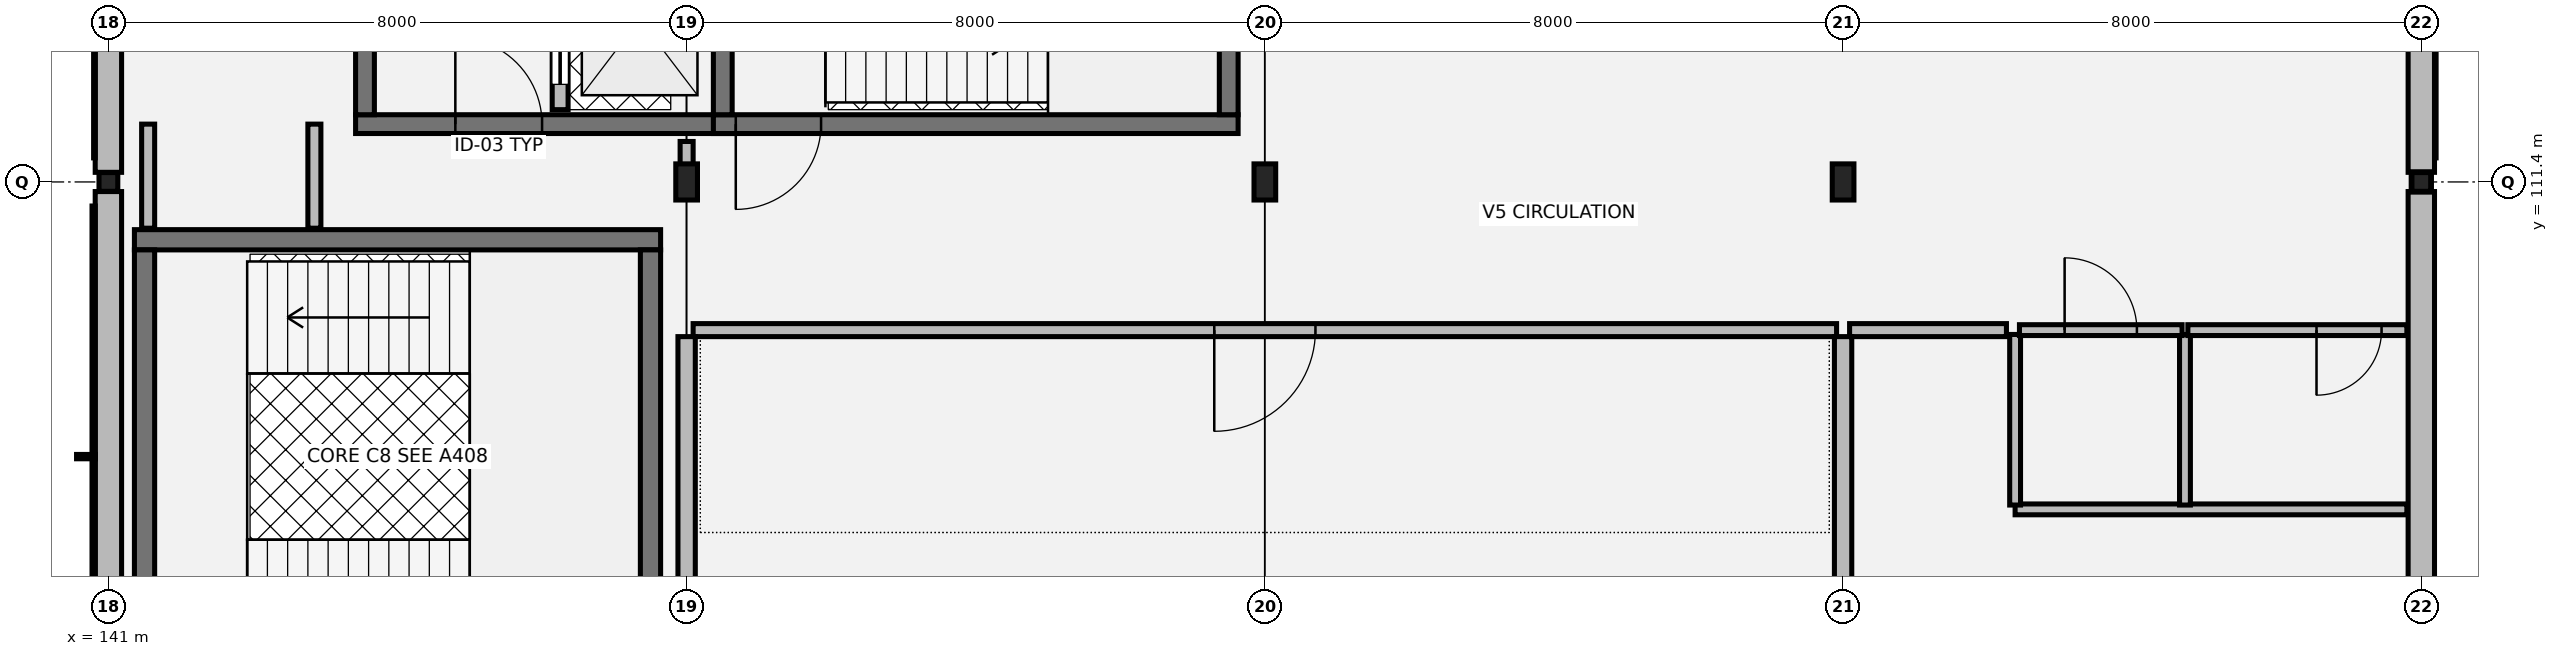
"""IFC4 building model, lengths in metres.
Left out: names, types, materials, properties, quantities, classifications, styles, units other than length and angle.
Written with IfcOpenShell. Run it as: python <this file> out.ifc"""

import sys

from ifc_helpers import new_model, si_unit, direction, frame, frame_2d, origin, origin_2d, place, context, subcontext, project, spatial, rectangle, hollow_rectangle, i_section, extrude, element, fill, save


model = new_model("IFC4")
c1 = context("Model", 3, precision=1e-05, world=origin(), true_north=direction((0.0, 1.0)))
c2 = subcontext(c1, "Body", "Model", "MODEL_VIEW")
j1 = project(units=[si_unit("LENGTHUNIT", "METRE"), si_unit("PLANEANGLEUNIT", "RADIAN")], contexts=[c1])
p1 = place(None, origin())
s1 = spatial("IfcSite", under=j1, at=p1, CompositionType="ELEMENT")
p2 = place(p1, origin())
s2 = spatial("IfcBuilding", under=s1, at=p2, CompositionType="ELEMENT")
p3 = place(p2, frame((0.0, 0.0, 9.18)))
s3 = spatial("IfcBuildingStorey", under=s2, at=p3, CompositionType="ELEMENT", Elevation=9.18)
p4 = place(p3, frame((141.0, 111.4, 0.0), z_axis=(0.0, 0.0, 1.0), x_axis=(1.0, 0.0, 0.0)))
e1 = element("IfcColumn", 1, at=p4, inside=s3, PredefinedType="COLUMN", context=c2, shape_type="SweptSolid", body=[
    extrude(hollow_rectangle(XDim=0.26, YDim=0.26, WallThickness=0.012, at=origin_2d()), origin(), (0.0, 0.0, 1.0), 4.055),
])
for number, where, z_axis, x_axis in (
    (2, (149.0, 111.4, 0.0), (0.0, 0.0, 1.0), (1.0, 0.0, 0.0)),
    (3, (157.0, 111.4, 0.0), (0.0, 0.0, 1.0), (1.0, 0.0, 0.0)),
    (4, (165.0, 111.4, 0.0), (0.0, 0.0, 1.0), (1.0, 0.0, 0.0)),
):
    element("IfcColumn", number, at=place(p3, frame(where, z_axis=z_axis, x_axis=x_axis)), inside=s3, PredefinedType="COLUMN", context=c2, shape_type="SweptSolid", body=[
        extrude(i_section(OverallWidth=0.3, OverallDepth=0.5, WebThickness=0.014, FlangeThickness=0.028, at=origin_2d()), origin(), (0.0, 0.0, 1.0), 4.055),
    ])
p5 = place(p3, frame((173.0, 111.4, 0.0), z_axis=(0.0, 0.0, 1.0), x_axis=(1.0, 0.0, 0.0)))
e5 = element("IfcColumn", 5, at=p5, inside=s3, PredefinedType="COLUMN", context=c2, shape_type="SweptSolid", body=[
    extrude(hollow_rectangle(XDim=0.26, YDim=0.26, WallThickness=0.012, at=origin_2d()), origin(), (0.0, 0.0, 1.0), 3.85),
])
p6 = place(p3, frame((173.0, 103.933, 0.0), z_axis=(0.0, 0.0, 1.0), x_axis=(0.0, 1.0, 0.0)))
e6 = element("IfcWall", 6, at=p6, inside=s3, PredefinedType="SOLIDWALL", context=c2, shape_type="SweptSolid", body=[
    extrude(rectangle(XDim=7.334, YDim=0.365, at=frame_2d((3.667, 0.0))), origin(), (0.0, 0.0, 1.0), 3.48),
])
p7 = place(p3, frame((173.0, 111.533, 0.0), z_axis=(0.0, 0.0, 1.0), x_axis=(0.0, 1.0, 0.0)))
e7 = element("IfcWall", 7, at=p7, inside=s3, PredefinedType="SOLIDWALL", context=c2, shape_type="SweptSolid", body=[
    extrude(rectangle(XDim=7.334, YDim=0.365, at=frame_2d((3.667, 0.0))), origin(), (0.0, 0.0, 1.0), 3.48),
])
p8 = place(p7, frame((2.192, 0.0, 0.8)))
e8 = element("IfcOpeningElement", 8, at=p8, cuts=e7, PredefinedType="OPENING", context=c2, shape_type="SweptSolid", body=[
    extrude(rectangle(XDim=1.15, YDim=2.1, at=frame_2d((0.575, 1.05))), frame((0.0, 0.192, 0.0), z_axis=(0.0, -1.0, 0.0), x_axis=(1.0, 0.0, 0.0)), (0.0, 0.0, 1.0), 0.385),
])
p9 = place(p7, frame((3.992, 0.0, 0.8)))
e9 = element("IfcOpeningElement", 9, at=p9, cuts=e7, PredefinedType="OPENING", context=c2, shape_type="SweptSolid", body=[
    extrude(rectangle(XDim=1.15, YDim=2.1, at=frame_2d((0.575, 1.05))), frame((0.0, 0.192, 0.0), z_axis=(0.0, -1.0, 0.0), x_axis=(1.0, 0.0, 0.0)), (0.0, 0.0, 1.0), 0.385),
])
p10 = place(p3, frame((141.0, 118.867, 0.0), z_axis=(0.0, 0.0, 1.0), x_axis=(0.0, -1.0, 0.0)))
e10 = element("IfcWall", 10, at=p10, inside=s3, PredefinedType="SOLIDWALL", context=c2, shape_type="SweptSolid", body=[
    extrude(rectangle(XDim=7.334, YDim=0.365, at=frame_2d((3.667, 0.0))), origin(), (0.0, 0.0, 1.0), 3.48),
])
p11 = place(p10, frame((2.192, 0.0, 0.8)))
e11 = element("IfcOpeningElement", 11, at=p11, cuts=e10, PredefinedType="OPENING", context=c2, shape_type="SweptSolid", body=[
    extrude(rectangle(XDim=1.15, YDim=2.1, at=frame_2d((0.575, 1.05))), frame((0.0, 0.192, 0.0), z_axis=(0.0, -1.0, 0.0), x_axis=(1.0, 0.0, 0.0)), (0.0, 0.0, 1.0), 0.385),
])
p12 = place(p10, frame((3.992, 0.0, 0.8)))
e12 = element("IfcOpeningElement", 12, at=p12, cuts=e10, PredefinedType="OPENING", context=c2, shape_type="SweptSolid", body=[
    extrude(rectangle(XDim=1.15, YDim=2.1, at=frame_2d((0.575, 1.05))), frame((0.0, 0.192, 0.0), z_axis=(0.0, -1.0, 0.0), x_axis=(1.0, 0.0, 0.0)), (0.0, 0.0, 1.0), 0.385),
])
p13 = place(p3, frame((141.0, 111.267, 0.0), z_axis=(0.0, 0.0, 1.0), x_axis=(0.0, -1.0, 0.0)))
e13 = element("IfcWall", 13, at=p13, inside=s3, PredefinedType="SOLIDWALL", context=c2, shape_type="SweptSolid", body=[
    extrude(rectangle(XDim=7.334, YDim=0.365, at=frame_2d((3.667, 0.0))), origin(), (0.0, 0.0, 1.0), 3.48),
])
p14 = place(p3, frame((144.42, 112.2, 0.0), z_axis=(0.0, 0.0, 1.0), x_axis=(1.0, 0.0, 0.0)))
e14 = element("IfcWall", 14, at=p14, inside=s3, PredefinedType="SHEAR", context=c2, shape_type="SweptSolid", body=[
    extrude(rectangle(XDim=5.21, YDim=0.26, at=frame_2d((2.605, 0.0))), origin(), (0.0, 0.0, 1.0), 3.845),
])
p15 = place(p14, frame((1.38, 0.0, 0.0)))
e15 = element("IfcOpeningElement", 15, at=p15, cuts=e14, PredefinedType="OPENING", context=c2, shape_type="SweptSolid", body=[
    extrude(rectangle(XDim=1.2, YDim=2.16, at=frame_2d((0.6, 1.08))), frame((0.0, 0.14, 0.0), z_axis=(0.0, -1.0, 0.0), x_axis=(1.0, 0.0, 0.0)), (0.0, 0.0, 1.0), 0.28),
])
p16 = place(p3, frame((144.55, 118.07, 0.0), z_axis=(0.0, 0.0, 1.0), x_axis=(0.0, -1.0, 0.0)))
e16 = element("IfcWall", 16, at=p16, inside=s3, PredefinedType="SHEAR", context=c2, shape_type="SweptSolid", body=[
    extrude(rectangle(XDim=5.74, YDim=0.26, at=frame_2d((2.87, 0.0))), origin(), (0.0, 0.0, 1.0), 3.845),
])
p17 = place(p3, frame((147.25, 112.4, 0.0), z_axis=(0.0, 0.0, 1.0), x_axis=(0.0, 1.0, 0.0)))
e17 = element("IfcWall", 17, at=p17, inside=s3, PredefinedType="SOLIDWALL", context=c2, shape_type="SweptSolid", body=[
    extrude(rectangle(XDim=5.6, YDim=0.22, at=frame_2d((2.8, 0.0))), origin(), (0.0, 0.0, 1.0), 3.845),
])
p18 = place(p17, frame((0.35, 0.0, 0.0)))
e18 = element("IfcOpeningElement", 18, at=p18, cuts=e17, PredefinedType="OPENING", context=c2, shape_type="SweptSolid", body=[
    extrude(rectangle(XDim=1.1, YDim=2.15, at=frame_2d((0.55, 1.075))), frame((0.0, 0.12, 0.0), z_axis=(0.0, -1.0, 0.0), x_axis=(1.0, 0.0, 0.0)), (0.0, 0.0, 1.0), 0.24),
])
p19 = place(p17, frame((2.4, 0.0, 0.0)))
e19 = element("IfcOpeningElement", 19, at=p19, cuts=e17, PredefinedType="OPENING", context=c2, shape_type="SweptSolid", body=[
    extrude(rectangle(XDim=1.3, YDim=2.18, at=frame_2d((0.65, 1.09))), frame((0.0, 0.12, 0.0), z_axis=(0.0, -1.0, 0.0), x_axis=(1.0, 0.0, 0.0)), (0.0, 0.0, 1.0), 0.24),
])
p20 = place(p3, frame((149.37, 112.2, 0.0), z_axis=(0.0, 0.0, 1.0), x_axis=(1.0, 0.0, 0.0)))
e20 = element("IfcWall", 20, at=p20, inside=s3, PredefinedType="SHEAR", context=c2, shape_type="SweptSolid", body=[
    extrude(rectangle(XDim=7.26, YDim=0.26, at=frame_2d((3.63, 0.0))), origin(), (0.0, 0.0, 1.0), 3.845),
])
p21 = place(p20, frame((0.31, 0.0, 0.0)))
e21 = element("IfcOpeningElement", 21, at=p21, cuts=e20, PredefinedType="OPENING", context=c2, shape_type="SweptSolid", body=[
    extrude(rectangle(XDim=1.18, YDim=2.18, at=frame_2d((0.59, 1.09))), frame((0.0, 0.14, 0.0), z_axis=(0.0, -1.0, 0.0), x_axis=(1.0, 0.0, 0.0)), (0.0, 0.0, 1.0), 0.28),
])
for number, where, z_axis, x_axis in (
    (22, (149.5, 112.33, 0.0), (0.0, 0.0, 1.0), (0.0, 1.0, 0.0)),
    (23, (156.5, 112.33, 0.0), (0.0, 0.0, 1.0), (0.0, 1.0, 0.0)),
):
    element("IfcWall", number, at=place(p3, frame(where, z_axis=z_axis, x_axis=x_axis)), inside=s3, PredefinedType="SHEAR", context=c2, shape_type="SweptSolid", body=[
        extrude(rectangle(XDim=5.74, YDim=0.26, at=frame_2d((2.87, 0.0))), origin(), (0.0, 0.0, 1.0), 3.845),
    ])
p22 = place(p3, frame((141.36, 110.6, 0.0), z_axis=(0.0, 0.0, 1.0), x_axis=(1.0, 0.0, 0.0)))
e24 = element("IfcWall", 24, at=p22, inside=s3, PredefinedType="SHEAR", context=c2, shape_type="SweptSolid", body=[
    extrude(rectangle(XDim=7.28, YDim=0.28, at=frame_2d((3.64, 0.0))), origin(), (0.0, 0.0, 1.0), 3.845),
])
for number, where, z_axis, x_axis in (
    (25, (141.5, 104.74, 0.0), (0.0, 0.0, 1.0), (0.0, 1.0, 0.0)),
    (26, (148.5, 104.74, 0.0), (0.0, 0.0, 1.0), (0.0, 1.0, 0.0)),
):
    element("IfcWall", number, at=place(p3, frame(where, z_axis=z_axis, x_axis=x_axis)), inside=s3, PredefinedType="SHEAR", context=c2, shape_type="SweptSolid", body=[
        extrude(rectangle(XDim=5.72, YDim=0.28, at=frame_2d((2.86, 0.0))), origin(), (0.0, 0.0, 1.0), 3.845),
    ])
p23 = place(p3, frame((167.38, 106.87, 0.0), z_axis=(0.0, 0.0, 1.0), x_axis=(1.0, 0.0, 0.0)))
e27 = element("IfcWall", 27, at=p23, inside=s3, PredefinedType="PARTITIONING", context=c2, shape_type="SweptSolid", body=[
    extrude(rectangle(XDim=5.42, YDim=0.15, at=frame_2d((2.71, 0.0))), origin(), (0.0, 0.0, 1.0), 3.18),
])
for number, where, z_axis, x_axis in (
    (28, (167.38, 106.93, 0.0), (0.0, 0.0, 1.0), (0.0, 1.0, 0.0)),
    (29, (169.73, 106.93, 0.0), (0.0, 0.0, 1.0), (0.0, 1.0, 0.0)),
):
    element("IfcWall", number, at=place(p3, frame(where, z_axis=z_axis, x_axis=x_axis)), inside=s3, PredefinedType="PARTITIONING", context=c2, shape_type="SweptSolid", body=[
        extrude(rectangle(XDim=2.36, YDim=0.15, at=frame_2d((1.18, 0.0))), origin(), (0.0, 0.0, 1.0), 3.18),
    ])
p24 = place(p3, frame((167.44, 109.35, 0.0), z_axis=(0.0, 0.0, 1.0), x_axis=(1.0, 0.0, 0.0)))
e30 = element("IfcWall", 30, at=p24, inside=s3, PredefinedType="PARTITIONING", context=c2, shape_type="SweptSolid", body=[
    extrude(rectangle(XDim=2.25, YDim=0.15, at=frame_2d((1.125, 0.0))), origin(), (0.0, 0.0, 1.0), 3.18),
])
p25 = place(p24, frame((0.625, 0.0, 0.0)))
e31 = element("IfcOpeningElement", 31, at=p25, cuts=e30, PredefinedType="OPENING", context=c2, shape_type="SweptSolid", body=[
    extrude(rectangle(XDim=1.0, YDim=2.15, at=frame_2d((0.5, 1.075))), frame((0.0, 0.085, 0.0), z_axis=(0.0, -1.0, 0.0), x_axis=(1.0, 0.0, 0.0)), (0.0, 0.0, 1.0), 0.17),
])
p26 = place(p3, frame((169.77, 109.35, 0.0), z_axis=(0.0, 0.0, 1.0), x_axis=(1.0, 0.0, 0.0)))
e32 = element("IfcWall", 32, at=p26, inside=s3, PredefinedType="PARTITIONING", context=c2, shape_type="SweptSolid", body=[
    extrude(rectangle(XDim=3.03, YDim=0.15, at=frame_2d((1.515, 0.0))), origin(), (0.0, 0.0, 1.0), 3.18),
])
p27 = place(p26, frame((1.78, 0.0, 0.0)))
e33 = element("IfcOpeningElement", 33, at=p27, cuts=e32, PredefinedType="OPENING", context=c2, shape_type="SweptSolid", body=[
    extrude(rectangle(XDim=0.9, YDim=2.15, at=frame_2d((0.45, 1.075))), frame((0.0, 0.085, 0.0), z_axis=(0.0, -1.0, 0.0), x_axis=(1.0, 0.0, 0.0)), (0.0, 0.0, 1.0), 0.17),
])
p28 = place(p3, frame((149.09, 109.35, 0.0), z_axis=(0.0, 0.0, 1.0), x_axis=(1.0, 0.0, 0.0)))
e34 = element("IfcWall", 34, at=p28, inside=s3, PredefinedType="PARTITIONING", context=c2, shape_type="SweptSolid", body=[
    extrude(rectangle(XDim=15.82, YDim=0.18, at=frame_2d((7.91, 0.0))), origin(), (0.0, 0.0, 1.0), 3.18),
])
p29 = place(p28, frame((7.21, 0.0, 0.0)))
e35 = element("IfcOpeningElement", 35, at=p29, cuts=e34, PredefinedType="OPENING", context=c2, shape_type="SweptSolid", body=[
    extrude(rectangle(XDim=1.4, YDim=2.22, at=frame_2d((0.7, 1.11))), frame((0.0, 0.1, 0.0), z_axis=(0.0, -1.0, 0.0), x_axis=(1.0, 0.0, 0.0)), (0.0, 0.0, 1.0), 0.2),
])
p30 = place(p3, frame((165.09, 109.35, 0.0), z_axis=(0.0, 0.0, 1.0), x_axis=(1.0, 0.0, 0.0)))
e36 = element("IfcWall", 36, at=p30, inside=s3, PredefinedType="PARTITIONING", context=c2, shape_type="SweptSolid", body=[
    extrude(rectangle(XDim=2.17, YDim=0.18, at=frame_2d((1.085, 0.0))), origin(), (0.0, 0.0, 1.0), 3.18),
])
p31 = place(p3, frame((149.0, 111.64, 0.0), z_axis=(0.0, 0.0, 1.0), x_axis=(0.0, 1.0, 0.0)))
e37 = element("IfcWall", 37, at=p31, inside=s3, PredefinedType="PARTITIONING", context=c2, shape_type="SweptSolid", body=[
    extrude(rectangle(XDim=0.32, YDim=0.18, at=frame_2d((0.16, 0.0))), origin(), (0.0, 0.0, 1.0), 3.18),
])
for number, where, z_axis, x_axis in (
    (38, (141.55, 110.76, 0.0), (0.0, 0.0, 1.0), (0.0, 1.0, 0.0)),
    (39, (143.85, 110.76, 0.0), (0.0, 0.0, 1.0), (0.0, 1.0, 0.0)),
):
    element("IfcWall", number, at=place(p3, frame(where, z_axis=z_axis, x_axis=x_axis)), inside=s3, PredefinedType="PARTITIONING", context=c2, shape_type="SweptSolid", body=[
        extrude(rectangle(XDim=1.44, YDim=0.18, at=frame_2d((0.72, 0.0))), origin(), (0.0, 0.0, 1.0), 3.18),
    ])
p32 = place(p3, frame((149.0, 73.72, 0.0), z_axis=(0.0, 0.0, 1.0), x_axis=(0.0, 1.0, 0.0)))
e40 = element("IfcWall", 40, at=p32, inside=s3, PredefinedType="SOLIDWALL", context=c2, shape_type="SweptSolid", body=[
    extrude(rectangle(XDim=35.54, YDim=0.24, at=frame_2d((17.77, 0.0))), origin(), (0.0, 0.0, 1.0), 3.18),
])
p33 = place(p32, frame((17.12, 0.0, 0.0)))
e41 = element("IfcOpeningElement", 41, at=p33, cuts=e40, PredefinedType="OPENING", context=c2, shape_type="SweptSolid", body=[
    extrude(rectangle(XDim=1.3, YDim=2.2, at=frame_2d((0.65, 1.1))), frame((0.0, 0.13, 0.0), z_axis=(0.0, -1.0, 0.0), x_axis=(1.0, 0.0, 0.0)), (0.0, 0.0, 1.0), 0.26),
])
p34 = place(p3, frame((165.0, 73.72, 0.0), z_axis=(0.0, 0.0, 1.0), x_axis=(0.0, 1.0, 0.0)))
e42 = element("IfcWall", 42, at=p34, inside=s3, PredefinedType="SOLIDWALL", context=c2, shape_type="SweptSolid", body=[
    extrude(rectangle(XDim=35.54, YDim=0.24, at=frame_2d((17.77, 0.0))), origin(), (0.0, 0.0, 1.0), 3.18),
])
p35 = place(p34, frame((17.12, 0.0, 0.0)))
e43 = element("IfcOpeningElement", 43, at=p35, cuts=e42, PredefinedType="OPENING", context=c2, shape_type="SweptSolid", body=[
    extrude(rectangle(XDim=1.3, YDim=2.2, at=frame_2d((0.65, 1.1))), frame((0.0, 0.13, 0.0), z_axis=(0.0, -1.0, 0.0), x_axis=(1.0, 0.0, 0.0)), (0.0, 0.0, 1.0), 0.26),
])
p36 = place(p15, origin())
e44 = element("IfcDoor", 44, at=p36, inside=s3, OperationType="SINGLE_SWING_LEFT", PredefinedType="DOOR", context=c2, shape_type="SweptSolid", body=[
    extrude(rectangle(XDim=1.2, YDim=2.16, at=frame_2d((0.6, 1.08))), frame((0.0, 0.025, 0.0), z_axis=(0.0, -1.0, 0.0), x_axis=(1.0, 0.0, 0.0)), (0.0, 0.0, 1.0), 0.05),
])
fill(e15, e44)
p37 = place(p18, origin())
e45 = element("IfcDoor", 45, at=p37, inside=s3, OperationType="SLIDING_TO_LEFT", PredefinedType="DOOR", context=c2, shape_type="SweptSolid", body=[
    extrude(rectangle(XDim=1.1, YDim=2.15, at=frame_2d((0.55, 1.075))), frame((0.0, 0.025, 0.0), z_axis=(0.0, -1.0, 0.0), x_axis=(1.0, 0.0, 0.0)), (0.0, 0.0, 1.0), 0.05),
])
fill(e18, e45)
p38 = place(p21, origin())
e46 = element("IfcDoor", 46, at=p38, inside=s3, OperationType="SINGLE_SWING_RIGHT", PredefinedType="DOOR", context=c2, shape_type="SweptSolid", body=[
    extrude(rectangle(XDim=1.18, YDim=2.18, at=frame_2d((0.59, 1.09))), frame((0.0, 0.025, 0.0), z_axis=(0.0, -1.0, 0.0), x_axis=(1.0, 0.0, 0.0)), (0.0, 0.0, 1.0), 0.05),
])
fill(e21, e46)
p39 = place(p25, origin())
e47 = element("IfcDoor", 47, at=p39, inside=s3, OperationType="SINGLE_SWING_LEFT", PredefinedType="DOOR", context=c2, shape_type="SweptSolid", body=[
    extrude(rectangle(XDim=1.0, YDim=2.15, at=frame_2d((0.5, 1.075))), frame((0.0, 0.025, 0.0), z_axis=(0.0, -1.0, 0.0), x_axis=(1.0, 0.0, 0.0)), (0.0, 0.0, 1.0), 0.05),
])
fill(e31, e47)
p40 = place(p27, origin())
e48 = element("IfcDoor", 48, at=p40, inside=s3, OperationType="SINGLE_SWING_RIGHT", PredefinedType="DOOR", context=c2, shape_type="SweptSolid", body=[
    extrude(rectangle(XDim=0.9, YDim=2.15, at=frame_2d((0.45, 1.075))), frame((0.0, 0.025, 0.0), z_axis=(0.0, -1.0, 0.0), x_axis=(1.0, 0.0, 0.0)), (0.0, 0.0, 1.0), 0.05),
])
fill(e33, e48)
p41 = place(p29, origin())
e49 = element("IfcDoor", 49, at=p41, inside=s3, OperationType="SINGLE_SWING_RIGHT", PredefinedType="DOOR", context=c2, shape_type="SweptSolid", body=[
    extrude(rectangle(XDim=1.4, YDim=2.22, at=frame_2d((0.7, 1.11))), frame((0.0, 0.025, 0.0), z_axis=(0.0, -1.0, 0.0), x_axis=(1.0, 0.0, 0.0)), (0.0, 0.0, 1.0), 0.05),
])
fill(e35, e49)
save(model, sys.argv[1])
